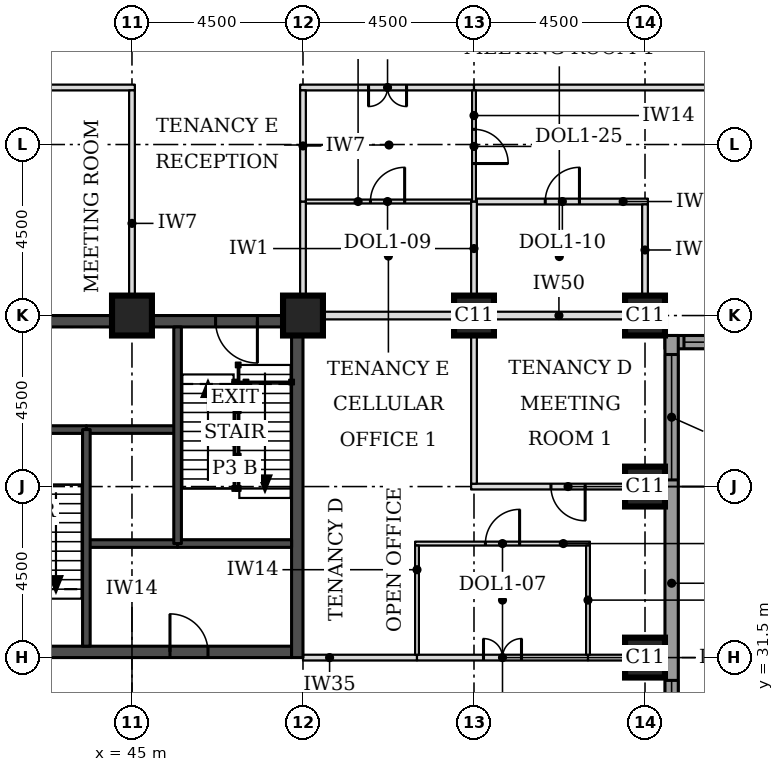
"""IFC4 building model, lengths in metres.
Left out: names, types, materials, properties, quantities, classifications, styles, units other than length and angle.
Written with IfcOpenShell. Run it as: python <this file> out.ifc"""

import sys

from ifc_helpers import new_model, si_unit, direction, frame, frame_2d, origin, origin_2d, place, context, subcontext, project, spatial, rectangle, extrude, element, fill, save


model = new_model("IFC4")
c1 = context("Model", 3, precision=1e-05, world=origin(), true_north=direction((0.0, 1.0)))
c2 = subcontext(c1, "Body", "Model", "MODEL_VIEW")
j1 = project(units=[si_unit("LENGTHUNIT", "METRE"), si_unit("PLANEANGLEUNIT", "RADIAN")], contexts=[c1])
p1 = place(None, origin())
s1 = spatial("IfcSite", under=j1, at=p1, CompositionType="ELEMENT")
p2 = place(p1, origin())
s2 = spatial("IfcBuilding", under=s1, at=p2, CompositionType="ELEMENT")
p3 = place(p2, frame((0.0, 0.0, 78.9)))
s3 = spatial("IfcBuildingStorey", under=s2, at=p3, CompositionType="ELEMENT", Elevation=78.9)
for number, where, z_axis, x_axis in (
    (1, (58.5, 31.5, 0.0), (0.0, 0.0, 1.0), (1.0, 0.0, 0.0)),
    (2, (58.5, 36.0, 0.0), (0.0, 0.0, 1.0), (1.0, 0.0, 0.0)),
    (3, (45.0, 40.5, 0.0), (0.0, 0.0, 1.0), (1.0, 0.0, 0.0)),
    (4, (49.5, 40.5, 0.0), (0.0, 0.0, 1.0), (1.0, 0.0, 0.0)),
    (5, (54.0, 40.5, 0.0), (0.0, 0.0, 1.0), (1.0, 0.0, 0.0)),
    (6, (58.5, 40.5, 0.0), (0.0, 0.0, 1.0), (1.0, 0.0, 0.0)),
):
    element("IfcColumn", number, at=place(p3, frame(where, z_axis=z_axis, x_axis=x_axis)), inside=s3, PredefinedType="COLUMN", context=c2, shape_type="SweptSolid", body=[
        extrude(rectangle(XDim=1.05, YDim=1.05, at=origin_2d()), origin(), (0.0, 0.0, 1.0), 3.7),
    ])
p4 = place(p3, frame((40.8, 31.65, 0.0), z_axis=(0.0, 0.0, 1.0), x_axis=(1.0, 0.0, 0.0)))
e7 = element("IfcWall", 7, at=p4, inside=s3, PredefinedType="SHEAR", context=c2, shape_type="SweptSolid", body=[
    extrude(rectangle(XDim=8.4, YDim=0.3, at=frame_2d((4.2, 0.0))), origin(), (0.0, 0.0, 1.0), 3.7),
])
p5 = place(p4, frame((5.2, 0.0, 0.0)))
e8 = element("IfcOpeningElement", 8, at=p5, cuts=e7, PredefinedType="OPENING", context=c2, shape_type="SweptSolid", body=[
    extrude(rectangle(XDim=1.0, YDim=2.1, at=frame_2d((0.5, 1.05))), frame((0.0, 0.16, 0.0), z_axis=(0.0, -1.0, 0.0), x_axis=(1.0, 0.0, 0.0)), (0.0, 0.0, 1.0), 0.32),
])
p6 = place(p3, frame((40.8, 40.35, 0.0), z_axis=(0.0, 0.0, 1.0), x_axis=(1.0, 0.0, 0.0)))
e9 = element("IfcWall", 9, at=p6, inside=s3, PredefinedType="SHEAR", context=c2, shape_type="SweptSolid", body=[
    extrude(rectangle(XDim=8.4, YDim=0.3, at=frame_2d((4.2, 0.0))), origin(), (0.0, 0.0, 1.0), 3.7),
])
p7 = place(p6, frame((6.4, 0.0, 0.0)))
e10 = element("IfcOpeningElement", 10, at=p7, cuts=e9, PredefinedType="OPENING", context=c2, shape_type="SweptSolid", body=[
    extrude(rectangle(XDim=1.1, YDim=2.1, at=frame_2d((0.55, 1.05))), frame((0.0, 0.16, 0.0), z_axis=(0.0, -1.0, 0.0), x_axis=(1.0, 0.0, 0.0)), (0.0, 0.0, 1.0), 0.32),
])
p8 = place(p3, frame((49.35, 31.5, 0.0), z_axis=(0.0, 0.0, 1.0), x_axis=(0.0, 1.0, 0.0)))
e11 = element("IfcWall", 11, at=p8, inside=s3, PredefinedType="SHEAR", context=c2, shape_type="SweptSolid", body=[
    extrude(rectangle(XDim=9.0, YDim=0.3, at=frame_2d((4.5, 0.0))), origin(), (0.0, 0.0, 1.0), 3.7),
])
p9 = place(p3, frame((59.025, 39.8, 0.0), z_axis=(0.0, 0.0, 1.0), x_axis=(1.0, 0.0, 0.0)))
e12 = element("IfcWall", 12, at=p9, inside=s3, PredefinedType="STANDARD", context=c2, shape_type="SweptSolid", body=[
    extrude(rectangle(XDim=13.337, YDim=0.35, at=frame_2d((6.669, 0.0))), origin(), (0.0, 0.0, 1.0), 3.525),
])
p10 = place(p9, frame((0.5, 0.0, 0.9)))
e13 = element("IfcOpeningElement", 13, at=p10, cuts=e12, PredefinedType="OPENING", context=c2, shape_type="SweptSolid", body=[
    extrude(rectangle(XDim=3.3, YDim=1.9, at=frame_2d((1.65, 0.95))), frame((0.0, 0.185, 0.0), z_axis=(0.0, -1.0, 0.0), x_axis=(1.0, 0.0, 0.0)), (0.0, 0.0, 1.0), 0.37),
])
p11 = place(p3, frame((59.2, 22.138, 0.0), z_axis=(0.0, 0.0, 1.0), x_axis=(0.0, 1.0, 0.0)))
e14 = element("IfcWall", 14, at=p11, inside=s3, PredefinedType="STANDARD", context=c2, shape_type="SweptSolid", body=[
    extrude(rectangle(XDim=17.837, YDim=0.35, at=frame_2d((8.919, 0.0))), origin(), (0.0, 0.0, 1.0), 3.525),
])
p12 = place(p11, frame((5.462, 0.0, 0.9)))
e15 = element("IfcOpeningElement", 15, at=p12, cuts=e14, PredefinedType="OPENING", context=c2, shape_type="SweptSolid", body=[
    extrude(rectangle(XDim=3.3, YDim=1.9, at=frame_2d((1.65, 0.95))), frame((0.0, 0.185, 0.0), z_axis=(0.0, -1.0, 0.0), x_axis=(1.0, 0.0, 0.0)), (0.0, 0.0, 1.0), 0.37),
])
p13 = place(p11, frame((14.037, 0.0, 0.9)))
e16 = element("IfcOpeningElement", 16, at=p13, cuts=e14, PredefinedType="OPENING", context=c2, shape_type="SweptSolid", body=[
    extrude(rectangle(XDim=3.3, YDim=1.9, at=frame_2d((1.65, 0.95))), frame((0.0, 0.185, 0.0), z_axis=(0.0, -1.0, 0.0), x_axis=(1.0, 0.0, 0.0)), (0.0, 0.0, 1.0), 0.37),
])
p14 = place(p3, frame((49.5, 31.5, 0.0), z_axis=(0.0, 0.0, 1.0), x_axis=(1.0, 0.0, 0.0)))
e17 = element("IfcWall", 17, at=p14, inside=s3, PredefinedType="PARTITIONING", context=c2, shape_type="SweptSolid", body=[
    extrude(rectangle(XDim=3.0, YDim=0.15, at=frame_2d((1.5, 0.0))), origin(), (0.0, 0.0, 1.0), 2.55),
])
p15 = place(p3, frame((52.5, 31.5, 0.0), z_axis=(0.0, 0.0, 1.0), x_axis=(1.0, 0.0, 0.0)))
e18 = element("IfcWall", 18, at=p15, inside=s3, PredefinedType="PARTITIONING", context=c2, shape_type="SweptSolid", body=[
    extrude(rectangle(XDim=4.5, YDim=0.15, at=frame_2d((2.25, 0.0))), origin(), (0.0, 0.0, 1.0), 2.55),
])
p16 = place(p15, frame((1.75, 0.0, 0.0)))
e19 = element("IfcOpeningElement", 19, at=p16, cuts=e18, PredefinedType="OPENING", context=c2, shape_type="SweptSolid", body=[
    extrude(rectangle(XDim=1.0, YDim=2.1, at=frame_2d((0.5, 1.05))), frame((0.0, 0.085, 0.0), z_axis=(0.0, -1.0, 0.0), x_axis=(1.0, 0.0, 0.0)), (0.0, 0.0, 1.0), 0.17),
])
p17 = place(p3, frame((57.0, 31.5, 0.0), z_axis=(0.0, 0.0, 1.0), x_axis=(1.0, 0.0, 0.0)))
e20 = element("IfcWall", 20, at=p17, inside=s3, PredefinedType="PARTITIONING", context=c2, shape_type="SweptSolid", body=[
    extrude(rectangle(XDim=2.025, YDim=0.15, at=frame_2d((1.012, 0.0))), origin(), (0.0, 0.0, 1.0), 2.55),
])
p18 = place(p3, frame((52.45, 34.5, 0.0), z_axis=(0.0, 0.0, 1.0), x_axis=(1.0, 0.0, 0.0)))
e21 = element("IfcWall", 21, at=p18, inside=s3, PredefinedType="PARTITIONING", context=c2, shape_type="SweptSolid", body=[
    extrude(rectangle(XDim=4.6, YDim=0.1, at=frame_2d((2.3, 0.0))), origin(), (0.0, 0.0, 1.0), 3.55),
])
p19 = place(p18, frame((1.85, 0.0, 0.0)))
e22 = element("IfcOpeningElement", 22, at=p19, cuts=e21, PredefinedType="OPENING", context=c2, shape_type="SweptSolid", body=[
    extrude(rectangle(XDim=0.9, YDim=2.1, at=frame_2d((0.45, 1.05))), frame((0.0, 0.06, 0.0), z_axis=(0.0, -1.0, 0.0), x_axis=(1.0, 0.0, 0.0)), (0.0, 0.0, 1.0), 0.12),
])
p20 = place(p3, frame((53.925, 36.0, 0.0), z_axis=(0.0, 0.0, 1.0), x_axis=(1.0, 0.0, 0.0)))
e23 = element("IfcWall", 23, at=p20, inside=s3, PredefinedType="PARTITIONING", context=c2, shape_type="SweptSolid", body=[
    extrude(rectangle(XDim=5.1, YDim=0.15, at=frame_2d((2.55, 0.0))), origin(), (0.0, 0.0, 1.0), 3.096),
])
p21 = place(p20, frame((2.1, 0.0, 0.0)))
e24 = element("IfcOpeningElement", 24, at=p21, cuts=e23, PredefinedType="OPENING", context=c2, shape_type="SweptSolid", body=[
    extrude(rectangle(XDim=0.9, YDim=2.1, at=frame_2d((0.45, 1.05))), frame((0.0, 0.085, 0.0), z_axis=(0.0, -1.0, 0.0), x_axis=(1.0, 0.0, 0.0)), (0.0, 0.0, 1.0), 0.17),
])
p22 = place(p3, frame((50.015, 40.5, 0.0), z_axis=(0.0, 0.0, 1.0), x_axis=(1.0, 0.0, 0.0)))
e25 = element("IfcWall", 25, at=p22, inside=s3, PredefinedType="PARTITIONING", context=c2, shape_type="SweptSolid", body=[
    extrude(rectangle(XDim=3.46, YDim=0.2, at=frame_2d((1.73, 0.0))), origin(), (0.0, 0.0, 1.0), 2.8),
])
p23 = place(p3, frame((54.495, 40.5, 0.0), z_axis=(0.0, 0.0, 1.0), x_axis=(1.0, 0.0, 0.0)))
e26 = element("IfcWall", 26, at=p23, inside=s3, PredefinedType="PARTITIONING", context=c2, shape_type="SweptSolid", body=[
    extrude(rectangle(XDim=3.48, YDim=0.2, at=frame_2d((1.74, 0.0))), origin(), (0.0, 0.0, 1.0), 2.8),
])
p24 = place(p3, frame((49.575, 43.5, 0.0), z_axis=(0.0, 0.0, 1.0), x_axis=(1.0, 0.0, 0.0)))
e27 = element("IfcWall", 27, at=p24, inside=s3, PredefinedType="PARTITIONING", context=c2, shape_type="SweptSolid", body=[
    extrude(rectangle(XDim=4.35, YDim=0.1, at=frame_2d((2.175, 0.0))), origin(), (0.0, 0.0, 1.0), 3.55),
])
p25 = place(p24, frame((1.7, 0.0, 0.0)))
e28 = element("IfcOpeningElement", 28, at=p25, cuts=e27, PredefinedType="OPENING", context=c2, shape_type="SweptSolid", body=[
    extrude(rectangle(XDim=0.9, YDim=2.1, at=frame_2d((0.45, 1.05))), frame((0.0, 0.06, 0.0), z_axis=(0.0, -1.0, 0.0), x_axis=(1.0, 0.0, 0.0)), (0.0, 0.0, 1.0), 0.12),
])
p26 = place(p3, frame((54.075, 43.5, 0.0), z_axis=(0.0, 0.0, 1.0), x_axis=(1.0, 0.0, 0.0)))
e29 = element("IfcWall", 29, at=p26, inside=s3, PredefinedType="PARTITIONING", context=c2, shape_type="SweptSolid", body=[
    extrude(rectangle(XDim=4.5, YDim=0.15, at=frame_2d((2.25, 0.0))), origin(), (0.0, 0.0, 1.0), 3.55),
])
p27 = place(p26, frame((1.8, 0.0, 0.0)))
e30 = element("IfcOpeningElement", 30, at=p27, cuts=e29, PredefinedType="OPENING", context=c2, shape_type="SweptSolid", body=[
    extrude(rectangle(XDim=0.9, YDim=2.1, at=frame_2d((0.45, 1.05))), frame((0.0, 0.085, 0.0), z_axis=(0.0, -1.0, 0.0), x_axis=(1.0, 0.0, 0.0)), (0.0, 0.0, 1.0), 0.17),
])
p28 = place(p3, frame((40.425, 46.5, 0.0), z_axis=(0.0, 0.0, 1.0), x_axis=(1.0, 0.0, 0.0)))
e31 = element("IfcWall", 31, at=p28, inside=s3, PredefinedType="PARTITIONING", context=c2, shape_type="SweptSolid", body=[
    extrude(rectangle(XDim=4.65, YDim=0.15, at=frame_2d((2.325, 0.0))), origin(), (0.0, 0.0, 1.0), 3.55),
])
p29 = place(p3, frame((49.425, 46.5, 0.0), z_axis=(0.0, 0.0, 1.0), x_axis=(1.0, 0.0, 0.0)))
e32 = element("IfcWall", 32, at=p29, inside=s3, PredefinedType="PARTITIONING", context=c2, shape_type="SweptSolid", body=[
    extrude(rectangle(XDim=4.575, YDim=0.15, at=frame_2d((2.288, 0.0))), origin(), (0.0, 0.0, 1.0), 3.55),
])
p30 = place(p29, frame((1.8, 0.0, 0.0)))
e33 = element("IfcOpeningElement", 33, at=p30, cuts=e32, PredefinedType="OPENING", context=c2, shape_type="SweptSolid", body=[
    extrude(rectangle(XDim=1.0, YDim=2.1, at=frame_2d((0.5, 1.05))), frame((0.0, 0.085, 0.0), z_axis=(0.0, -1.0, 0.0), x_axis=(1.0, 0.0, 0.0)), (0.0, 0.0, 1.0), 0.17),
])
p31 = place(p3, frame((54.0, 46.5, 0.0), z_axis=(0.0, 0.0, 1.0), x_axis=(1.0, 0.0, 0.0)))
e34 = element("IfcWall", 34, at=p31, inside=s3, PredefinedType="PARTITIONING", context=c2, shape_type="SweptSolid", body=[
    extrude(rectangle(XDim=16.5, YDim=0.15, at=frame_2d((8.25, 0.0))), origin(), (0.0, 0.0, 1.0), 3.55),
])
for number, where, z_axis, x_axis in (
    (35, (52.5, 31.575, 0.0), (0.0, 0.0, 1.0), (0.0, 1.0, 0.0)),
    (36, (57.0, 31.575, 0.0), (0.0, 0.0, 1.0), (0.0, 1.0, 0.0)),
):
    element("IfcWall", number, at=place(p3, frame(where, z_axis=z_axis, x_axis=x_axis)), inside=s3, PredefinedType="PARTITIONING", context=c2, shape_type="SweptSolid", body=[
        extrude(rectangle(XDim=2.875, YDim=0.1, at=frame_2d((1.438, 0.0))), origin(), (0.0, 0.0, 1.0), 3.55),
    ])
p32 = place(p3, frame((54.0, 36.075, 0.0), z_axis=(0.0, 0.0, 1.0), x_axis=(0.0, 1.0, 0.0)))
e37 = element("IfcWall", 37, at=p32, inside=s3, PredefinedType="PARTITIONING", context=c2, shape_type="SweptSolid", body=[
    extrude(rectangle(XDim=3.9, YDim=0.15, at=frame_2d((1.95, 0.0))), origin(), (0.0, 0.0, 1.0), 3.55),
])
p33 = place(p3, frame((45.0, 41.025, 0.0), z_axis=(0.0, 0.0, 1.0), x_axis=(0.0, 1.0, 0.0)))
e38 = element("IfcWall", 38, at=p33, inside=s3, PredefinedType="PARTITIONING", context=c2, shape_type="SweptSolid", body=[
    extrude(rectangle(XDim=5.4, YDim=0.15, at=frame_2d((2.7, 0.0))), origin(), (0.0, 0.0, 1.0), 3.55),
])
for number, where, z_axis, x_axis in (
    (39, (49.5, 41.025, 0.0), (0.0, 0.0, 1.0), (0.0, 1.0, 0.0)),
    (40, (54.0, 41.025, 0.0), (0.0, 0.0, 1.0), (0.0, 1.0, 0.0)),
):
    element("IfcWall", number, at=place(p3, frame(where, z_axis=z_axis, x_axis=x_axis)), inside=s3, PredefinedType="PARTITIONING", context=c2, shape_type="SweptSolid", body=[
        extrude(rectangle(XDim=2.475, YDim=0.15, at=frame_2d((1.238, 0.0))), origin(), (0.0, 0.0, 1.0), 3.55),
    ])
p34 = place(p3, frame((58.5, 41.025, 0.0), z_axis=(0.0, 0.0, 1.0), x_axis=(0.0, 1.0, 0.0)))
e41 = element("IfcWall", 41, at=p34, inside=s3, PredefinedType="PARTITIONING", context=c2, shape_type="SweptSolid", body=[
    extrude(rectangle(XDim=2.4, YDim=0.15, at=frame_2d((1.2, 0.0))), origin(), (0.0, 0.0, 1.0), 3.55),
])
p35 = place(p3, frame((49.5, 43.5, 0.0), z_axis=(0.0, 0.0, 1.0), x_axis=(0.0, 1.0, 0.0)))
e42 = element("IfcWall", 42, at=p35, inside=s3, PredefinedType="PARTITIONING", context=c2, shape_type="SweptSolid", body=[
    extrude(rectangle(XDim=2.925, YDim=0.15, at=frame_2d((1.462, 0.0))), origin(), (0.0, 0.0, 1.0), 3.55),
])
p36 = place(p3, frame((54.0, 43.5, 0.0), z_axis=(0.0, 0.0, 1.0), x_axis=(0.0, 1.0, 0.0)))
e43 = element("IfcWall", 43, at=p36, inside=s3, PredefinedType="PARTITIONING", context=c2, shape_type="SweptSolid", body=[
    extrude(rectangle(XDim=2.925, YDim=0.1, at=frame_2d((1.462, 0.0))), origin(), (0.0, 0.0, 1.0), 3.55),
])
p37 = place(p36, frame((1.0, 0.0, 0.0)))
e44 = element("IfcOpeningElement", 44, at=p37, cuts=e43, PredefinedType="OPENING", context=c2, shape_type="SweptSolid", body=[
    extrude(rectangle(XDim=0.9, YDim=2.1, at=frame_2d((0.45, 1.05))), frame((0.0, 0.06, 0.0), z_axis=(0.0, -1.0, 0.0), x_axis=(1.0, 0.0, 0.0)), (0.0, 0.0, 1.0), 0.12),
])
p38 = place(p3, frame((43.8, 34.5, 0.0), z_axis=(0.0, 0.0, 1.0), x_axis=(1.0, 0.0, 0.0)))
e45 = element("IfcWall", 45, at=p38, inside=s3, PredefinedType="SOLIDWALL", context=c2, shape_type="SweptSolid", body=[
    extrude(rectangle(XDim=2.4, YDim=0.2, at=frame_2d((1.2, 0.0))), origin(), (0.0, 0.0, 1.0), 3.55),
])
p39 = place(p3, frame((46.2, 34.5, 0.0), z_axis=(0.0, 0.0, 1.0), x_axis=(1.0, 0.0, 0.0)))
e46 = element("IfcWall", 46, at=p39, inside=s3, PredefinedType="SOLIDWALL", context=c2, shape_type="SweptSolid", body=[
    extrude(rectangle(XDim=3.0, YDim=0.2, at=frame_2d((1.5, 0.0))), origin(), (0.0, 0.0, 1.0), 3.55),
])
p40 = place(p3, frame((43.8, 37.5, 0.0), z_axis=(0.0, 0.0, 1.0), x_axis=(1.0, 0.0, 0.0)))
e47 = element("IfcWall", 47, at=p40, inside=s3, PredefinedType="SOLIDWALL", context=c2, shape_type="SweptSolid", body=[
    extrude(rectangle(XDim=2.4, YDim=0.2, at=frame_2d((1.2, 0.0))), origin(), (0.0, 0.0, 1.0), 3.7),
])
p41 = place(p3, frame((40.8, 37.5, 0.0), z_axis=(0.0, 0.0, 1.0), x_axis=(1.0, 0.0, 0.0)))
e48 = element("IfcWall", 48, at=p41, inside=s3, PredefinedType="SOLIDWALL", context=c2, shape_type="SweptSolid", body=[
    extrude(rectangle(XDim=3.0, YDim=0.2, at=frame_2d((1.5, 0.0))), origin(), (0.0, 0.0, 1.0), 3.55),
])
for number, where, z_axis, x_axis in (
    (49, (43.8, 31.8, 0.0), (0.0, 0.0, 1.0), (0.0, 1.0, 0.0)),
    (50, (46.2, 34.5, 0.0), (0.0, 0.0, 1.0), (0.0, 1.0, 0.0)),
):
    element("IfcWall", number, at=place(p3, frame(where, z_axis=z_axis, x_axis=x_axis)), inside=s3, PredefinedType="SOLIDWALL", context=c2, shape_type="SweptSolid", body=[
        extrude(rectangle(XDim=5.7, YDim=0.2, at=frame_2d((2.85, 0.0))), origin(), (0.0, 0.0, 1.0), 3.55),
    ])
p42 = place(p10, origin())
e51 = element("IfcWindow", 51, at=p42, inside=s3, PartitioningType="SINGLE_PANEL", PredefinedType="WINDOW", context=c2, shape_type="SweptSolid", body=[
    extrude(rectangle(XDim=3.3, YDim=1.9, at=frame_2d((1.65, 0.95))), frame((0.0, 0.085, 0.0), z_axis=(0.0, -1.0, 0.0), x_axis=(1.0, 0.0, 0.0)), (0.0, 0.0, 1.0), 0.06),
])
fill(e13, e51)
p43 = place(p12, origin())
e52 = element("IfcWindow", 52, at=p43, inside=s3, PartitioningType="SINGLE_PANEL", PredefinedType="WINDOW", context=c2, shape_type="SweptSolid", body=[
    extrude(rectangle(XDim=3.3, YDim=1.9, at=frame_2d((1.65, 0.95))), frame((0.0, 0.085, 0.0), z_axis=(0.0, -1.0, 0.0), x_axis=(1.0, 0.0, 0.0)), (0.0, 0.0, 1.0), 0.06),
])
fill(e15, e52)
p44 = place(p13, origin())
e53 = element("IfcWindow", 53, at=p44, inside=s3, PartitioningType="SINGLE_PANEL", PredefinedType="WINDOW", context=c2, shape_type="SweptSolid", body=[
    extrude(rectangle(XDim=3.3, YDim=1.9, at=frame_2d((1.65, 0.95))), frame((0.0, 0.085, 0.0), z_axis=(0.0, -1.0, 0.0), x_axis=(1.0, 0.0, 0.0)), (0.0, 0.0, 1.0), 0.06),
])
fill(e16, e53)
p45 = place(p16, origin())
e54 = element("IfcDoor", 54, at=p45, inside=s3, OperationType="DOUBLE_DOOR_SINGLE_SWING", PredefinedType="DOOR", context=c2, shape_type="SweptSolid", body=[
    extrude(rectangle(XDim=1.0, YDim=2.1, at=frame_2d((0.5, 1.05))), frame((0.0, 0.025, 0.0), z_axis=(0.0, -1.0, 0.0), x_axis=(1.0, 0.0, 0.0)), (0.0, 0.0, 1.0), 0.05),
])
fill(e19, e54)
p46 = place(p19, origin())
e55 = element("IfcDoor", 55, at=p46, inside=s3, OperationType="SINGLE_SWING_RIGHT", PredefinedType="DOOR", context=c2, shape_type="SweptSolid", body=[
    extrude(rectangle(XDim=0.9, YDim=2.1, at=frame_2d((0.45, 1.05))), frame((0.0, 0.025, 0.0), z_axis=(0.0, -1.0, 0.0), x_axis=(1.0, 0.0, 0.0)), (0.0, 0.0, 1.0), 0.05),
])
fill(e22, e55)
p47 = place(p21, frame((0.9, 0.0, 0.0), z_axis=(0.0, 0.0, 1.0), x_axis=(-1.0, 0.0, 0.0)))
e56 = element("IfcDoor", 56, at=p47, inside=s3, OperationType="SINGLE_SWING_LEFT", PredefinedType="DOOR", context=c2, shape_type="SweptSolid", body=[
    extrude(rectangle(XDim=0.9, YDim=2.1, at=frame_2d((0.45, 1.05))), frame((0.0, 0.025, 0.0), z_axis=(0.0, -1.0, 0.0), x_axis=(1.0, 0.0, 0.0)), (0.0, 0.0, 1.0), 0.05),
])
fill(e24, e56)
p48 = place(p30, frame((1.0, 0.0, 0.0), z_axis=(0.0, 0.0, 1.0), x_axis=(-1.0, 0.0, 0.0)))
e57 = element("IfcDoor", 57, at=p48, inside=s3, OperationType="DOUBLE_DOOR_SINGLE_SWING", PredefinedType="DOOR", context=c2, shape_type="SweptSolid", body=[
    extrude(rectangle(XDim=1.0, YDim=2.1, at=frame_2d((0.5, 1.05))), frame((0.0, 0.025, 0.0), z_axis=(0.0, -1.0, 0.0), x_axis=(1.0, 0.0, 0.0)), (0.0, 0.0, 1.0), 0.05),
])
fill(e33, e57)
p49 = place(p37, frame((0.9, 0.0, 0.0), z_axis=(0.0, 0.0, 1.0), x_axis=(-1.0, 0.0, 0.0)))
e58 = element("IfcDoor", 58, at=p49, inside=s3, OperationType="SINGLE_SWING_RIGHT", PredefinedType="DOOR", context=c2, shape_type="SweptSolid", body=[
    extrude(rectangle(XDim=0.9, YDim=2.1, at=frame_2d((0.45, 1.05))), frame((0.0, 0.025, 0.0), z_axis=(0.0, -1.0, 0.0), x_axis=(1.0, 0.0, 0.0)), (0.0, 0.0, 1.0), 0.05),
])
fill(e44, e58)
p50 = place(p25, origin())
e59 = element("IfcDoor", 59, at=p50, inside=s3, OperationType="SINGLE_SWING_RIGHT", PredefinedType="DOOR", context=c2, shape_type="SweptSolid", body=[
    extrude(rectangle(XDim=0.9, YDim=2.1, at=frame_2d((0.45, 1.05))), frame((0.0, 0.025, 0.0), z_axis=(0.0, -1.0, 0.0), x_axis=(1.0, 0.0, 0.0)), (0.0, 0.0, 1.0), 0.05),
])
fill(e28, e59)
p51 = place(p27, origin())
e60 = element("IfcDoor", 60, at=p51, inside=s3, OperationType="SINGLE_SWING_RIGHT", PredefinedType="DOOR", context=c2, shape_type="SweptSolid", body=[
    extrude(rectangle(XDim=0.9, YDim=2.1, at=frame_2d((0.45, 1.05))), frame((0.0, 0.025, 0.0), z_axis=(0.0, -1.0, 0.0), x_axis=(1.0, 0.0, 0.0)), (0.0, 0.0, 1.0), 0.05),
])
fill(e30, e60)
p52 = place(p7, frame((1.1, 0.0, 0.0), z_axis=(0.0, 0.0, 1.0), x_axis=(-1.0, 0.0, 0.0)))
e61 = element("IfcDoor", 61, at=p52, inside=s3, OperationType="SINGLE_SWING_LEFT", PredefinedType="DOOR", context=c2, shape_type="SweptSolid", body=[
    extrude(rectangle(XDim=1.1, YDim=2.1, at=frame_2d((0.55, 1.05))), frame((0.0, 0.025, 0.0), z_axis=(0.0, -1.0, 0.0), x_axis=(1.0, 0.0, 0.0)), (0.0, 0.0, 1.0), 0.05),
])
fill(e10, e61)
p53 = place(p5, origin())
e62 = element("IfcDoor", 62, at=p53, inside=s3, OperationType="SINGLE_SWING_LEFT", PredefinedType="DOOR", context=c2, shape_type="SweptSolid", body=[
    extrude(rectangle(XDim=1.0, YDim=2.1, at=frame_2d((0.5, 1.05))), frame((0.0, 0.025, 0.0), z_axis=(0.0, -1.0, 0.0), x_axis=(1.0, 0.0, 0.0)), (0.0, 0.0, 1.0), 0.05),
])
fill(e8, e62)
save(model, sys.argv[1])
